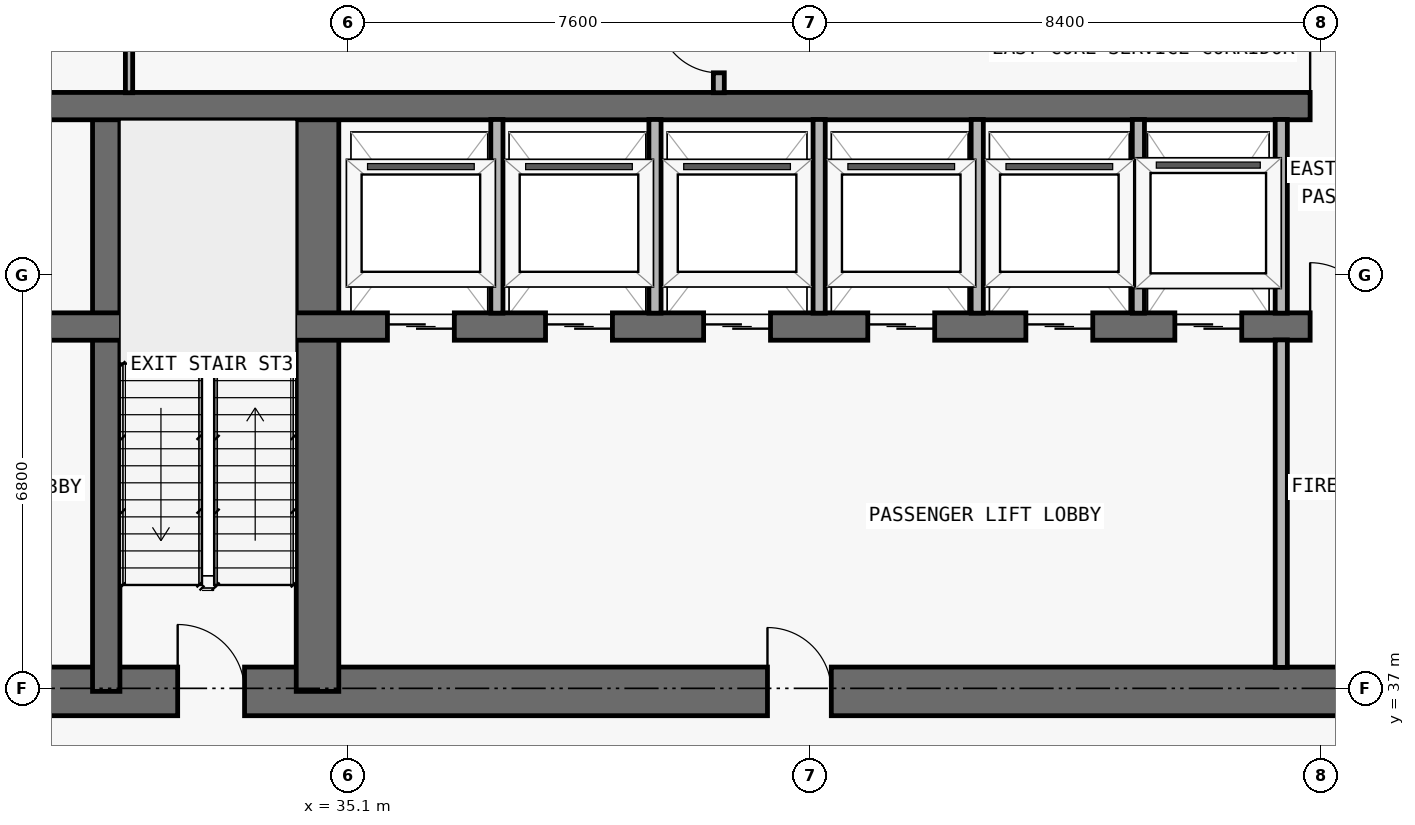
"""IFC4 building model, lengths in metres.
Left out: names, types, materials, properties, quantities, classifications, styles, units other than length and angle.
Written with IfcOpenShell. Run it as: python <this file> out.ifc"""

import sys

from ifc_helpers import new_model, si_unit, direction, frame, frame_2d, origin, place, context, subcontext, project, spatial, rectangle, extrude, element, fill, save


model = new_model("IFC4")
c1 = context("Model", 3, precision=1e-05, world=origin(), true_north=direction((0.0, 1.0)))
c2 = subcontext(c1, "Body", "Model", "MODEL_VIEW")
j1 = project(units=[si_unit("LENGTHUNIT", "METRE"), si_unit("PLANEANGLEUNIT", "RADIAN")], contexts=[c1])
p1 = place(None, origin())
s1 = spatial("IfcSite", under=j1, at=p1, CompositionType="ELEMENT")
p2 = place(p1, origin())
s2 = spatial("IfcBuilding", under=s1, at=p2, CompositionType="ELEMENT")
p3 = place(p2, frame((0.0, 0.0, 97.8)))
s3 = spatial("IfcBuildingStorey", under=s2, at=p3, CompositionType="ELEMENT", Elevation=97.8)
p4 = place(p3, frame((17.85, 36.95, 0.0), z_axis=(0.0, 0.0, 1.0), x_axis=(1.0, 0.0, 0.0)))
e1 = element("IfcWall", 1, at=p4, inside=s3, PredefinedType="SHEAR", context=c2, shape_type="SweptSolid", body=[
    extrude(rectangle(XDim=42.1, YDim=0.8, at=frame_2d((21.05, 0.0))), origin(), (0.0, 0.0, 1.0), 4.55),
])
p5 = place(p4, frame((14.45, 0.0, 0.0)))
e2 = element("IfcOpeningElement", 2, at=p5, cuts=e1, PredefinedType="OPENING", context=c2, shape_type="SweptSolid", body=[
    extrude(rectangle(XDim=1.1, YDim=2.15, at=frame_2d((0.55, 1.075))), frame((0.0, 0.41, 0.0), z_axis=(0.0, -1.0, 0.0), x_axis=(1.0, 0.0, 0.0)), (0.0, 0.0, 1.0), 0.82),
])
p6 = place(p4, frame((6.3, 0.0, 0.0)))
e3 = element("IfcOpeningElement", 3, at=p6, cuts=e1, PredefinedType="OPENING", context=c2, shape_type="SweptSolid", body=[
    extrude(rectangle(XDim=1.05, YDim=2.15, at=frame_2d((0.525, 1.075))), frame((0.0, 0.41, 0.0), z_axis=(0.0, -1.0, 0.0), x_axis=(1.0, 0.0, 0.0)), (0.0, 0.0, 1.0), 0.82),
])
p7 = place(p4, frame((34.8, 0.0, 0.0)))
e4 = element("IfcOpeningElement", 4, at=p7, cuts=e1, PredefinedType="OPENING", context=c2, shape_type="SweptSolid", body=[
    extrude(rectangle(XDim=1.05, YDim=2.15, at=frame_2d((0.525, 1.075))), frame((0.0, 0.41, 0.0), z_axis=(0.0, -1.0, 0.0), x_axis=(1.0, 0.0, 0.0)), (0.0, 0.0, 1.0), 0.82),
])
p8 = place(p4, frame((10.913, 0.0, 0.0)))
e5 = element("IfcOpeningElement", 5, at=p8, cuts=e1, PredefinedType="OPENING", context=c2, shape_type="SweptSolid", body=[
    extrude(rectangle(XDim=1.05, YDim=2.15, at=frame_2d((0.525, 1.075))), frame((0.0, 0.41, 0.0), z_axis=(0.0, -1.0, 0.0), x_axis=(1.0, 0.0, 0.0)), (0.0, 0.0, 1.0), 0.82),
])
p9 = place(p4, frame((24.15, 0.0, 0.0)))
e6 = element("IfcOpeningElement", 6, at=p9, cuts=e1, PredefinedType="OPENING", context=c2, shape_type="SweptSolid", body=[
    extrude(rectangle(XDim=1.05, YDim=2.15, at=frame_2d((0.525, 1.075))), frame((0.0, 0.41, 0.0), z_axis=(0.0, -1.0, 0.0), x_axis=(1.0, 0.0, 0.0)), (0.0, 0.0, 1.0), 0.82),
])
p10 = place(p3, frame((31.125, 36.95, 0.0), z_axis=(0.0, 0.0, 1.0), x_axis=(0.0, 1.0, 0.0)))
e7 = element("IfcWall", 7, at=p10, inside=s3, PredefinedType="SHEAR", context=c2, shape_type="SweptSolid", body=[
    extrude(rectangle(XDim=9.625, YDim=0.45, at=frame_2d((4.812, 0.0))), origin(), (0.0, 0.0, 1.0), 4.55),
])
p11 = place(p3, frame((34.6, 36.95, 0.0), z_axis=(0.0, 0.0, 1.0), x_axis=(0.0, 1.0, 0.0)))
e8 = element("IfcWall", 8, at=p11, inside=s3, PredefinedType="SHEAR", context=c2, shape_type="SweptSolid", body=[
    extrude(rectangle(XDim=9.625, YDim=0.7, at=frame_2d((4.812, 0.0))), origin(), (0.0, 0.0, 1.0), 4.55),
])
p12 = place(p3, frame((22.25, 42.95, 0.0), z_axis=(0.0, 0.0, 1.0), x_axis=(1.0, 0.0, 0.0)))
e9 = element("IfcWall", 9, at=p12, inside=s3, PredefinedType="SHEAR", context=c2, shape_type="SweptSolid", body=[
    extrude(rectangle(XDim=33.3, YDim=0.45, at=frame_2d((16.65, 0.0))), origin(), (0.0, 0.0, 1.0), 4.55),
])
p13 = place(p12, frame((1.05, 0.0, 0.0)))
e10 = element("IfcOpeningElement", 10, at=p13, cuts=e9, PredefinedType="OPENING", context=c2, shape_type="SweptSolid", body=[
    extrude(rectangle(XDim=1.2, YDim=2.2, at=frame_2d((0.6, 1.1))), frame((0.0, 0.235, 0.0), z_axis=(0.0, -1.0, 0.0), x_axis=(1.0, 0.0, 0.0)), (0.0, 0.0, 1.0), 0.47),
])
p14 = place(p12, frame((31.05, 0.0, 0.0)))
e11 = element("IfcOpeningElement", 11, at=p14, cuts=e9, PredefinedType="OPENING", context=c2, shape_type="SweptSolid", body=[
    extrude(rectangle(XDim=1.2, YDim=2.2, at=frame_2d((0.6, 1.1))), frame((0.0, 0.235, 0.0), z_axis=(0.0, -1.0, 0.0), x_axis=(1.0, 0.0, 0.0)), (0.0, 0.0, 1.0), 0.47),
])
p15 = place(p12, frame((13.5, 0.0, 0.0)))
e12 = element("IfcOpeningElement", 12, at=p15, cuts=e9, PredefinedType="OPENING", context=c2, shape_type="SweptSolid", body=[
    extrude(rectangle(XDim=1.1, YDim=2.2, at=frame_2d((0.55, 1.1))), frame((0.0, 0.235, 0.0), z_axis=(0.0, -1.0, 0.0), x_axis=(1.0, 0.0, 0.0)), (0.0, 0.0, 1.0), 0.47),
])
p16 = place(p12, frame((16.1, 0.0, 0.0)))
e13 = element("IfcOpeningElement", 13, at=p16, cuts=e9, PredefinedType="OPENING", context=c2, shape_type="SweptSolid", body=[
    extrude(rectangle(XDim=1.1, YDim=2.2, at=frame_2d((0.55, 1.1))), frame((0.0, 0.235, 0.0), z_axis=(0.0, -1.0, 0.0), x_axis=(1.0, 0.0, 0.0)), (0.0, 0.0, 1.0), 0.47),
])
p17 = place(p12, frame((18.7, 0.0, 0.0)))
e14 = element("IfcOpeningElement", 14, at=p17, cuts=e9, PredefinedType="OPENING", context=c2, shape_type="SweptSolid", body=[
    extrude(rectangle(XDim=1.1, YDim=2.2, at=frame_2d((0.55, 1.1))), frame((0.0, 0.235, 0.0), z_axis=(0.0, -1.0, 0.0), x_axis=(1.0, 0.0, 0.0)), (0.0, 0.0, 1.0), 0.47),
])
p18 = place(p12, frame((21.4, 0.0, 0.0)))
e15 = element("IfcOpeningElement", 15, at=p18, cuts=e9, PredefinedType="OPENING", context=c2, shape_type="SweptSolid", body=[
    extrude(rectangle(XDim=1.1, YDim=2.2, at=frame_2d((0.55, 1.1))), frame((0.0, 0.235, 0.0), z_axis=(0.0, -1.0, 0.0), x_axis=(1.0, 0.0, 0.0)), (0.0, 0.0, 1.0), 0.47),
])
p19 = place(p12, frame((24.0, 0.0, 0.0)))
e16 = element("IfcOpeningElement", 16, at=p19, cuts=e9, PredefinedType="OPENING", context=c2, shape_type="SweptSolid", body=[
    extrude(rectangle(XDim=1.1, YDim=2.2, at=frame_2d((0.55, 1.1))), frame((0.0, 0.235, 0.0), z_axis=(0.0, -1.0, 0.0), x_axis=(1.0, 0.0, 0.0)), (0.0, 0.0, 1.0), 0.47),
])
p20 = place(p12, frame((26.45, 0.0, 0.0)))
e17 = element("IfcOpeningElement", 17, at=p20, cuts=e9, PredefinedType="OPENING", context=c2, shape_type="SweptSolid", body=[
    extrude(rectangle(XDim=1.1, YDim=2.2, at=frame_2d((0.55, 1.1))), frame((0.0, 0.235, 0.0), z_axis=(0.0, -1.0, 0.0), x_axis=(1.0, 0.0, 0.0)), (0.0, 0.0, 1.0), 0.47),
])
p21 = place(p12, frame((5.95, 0.0, 0.0)))
e18 = element("IfcOpeningElement", 18, at=p21, cuts=e9, PredefinedType="OPENING", context=c2, shape_type="SweptSolid", body=[
    extrude(rectangle(XDim=1.1, YDim=2.2, at=frame_2d((0.55, 1.1))), frame((0.0, 0.235, 0.0), z_axis=(0.0, -1.0, 0.0), x_axis=(1.0, 0.0, 0.0)), (0.0, 0.0, 1.0), 0.47),
])
p22 = place(p12, frame((3.625, 0.0, 0.0)))
e19 = element("IfcOpeningElement", 19, at=p22, cuts=e9, PredefinedType="OPENING", context=c2, shape_type="SweptSolid", body=[
    extrude(rectangle(XDim=1.05, YDim=2.15, at=frame_2d((0.525, 1.075))), frame((0.0, 0.235, 0.0), z_axis=(0.0, -1.0, 0.0), x_axis=(1.0, 0.0, 0.0)), (0.0, 0.0, 1.0), 0.47),
])
p23 = place(p12, frame((28.675, 0.0, 0.0)))
e20 = element("IfcOpeningElement", 20, at=p23, cuts=e9, PredefinedType="OPENING", context=c2, shape_type="SweptSolid", body=[
    extrude(rectangle(XDim=1.05, YDim=2.15, at=frame_2d((0.525, 1.075))), frame((0.0, 0.235, 0.0), z_axis=(0.0, -1.0, 0.0), x_axis=(1.0, 0.0, 0.0)), (0.0, 0.0, 1.0), 0.47),
])
p24 = place(p3, frame((18.25, 46.575, 0.0), z_axis=(0.0, 0.0, 1.0), x_axis=(1.0, 0.0, 0.0)))
e21 = element("IfcWall", 21, at=p24, inside=s3, PredefinedType="SHEAR", context=c2, shape_type="SweptSolid", body=[
    extrude(rectangle(XDim=41.3, YDim=0.45, at=frame_2d((20.65, 0.0))), origin(), (0.0, 0.0, 1.0), 4.55),
])
p25 = place(p24, frame((7.65, 0.0, 0.0)))
e22 = element("IfcOpeningElement", 22, at=p25, cuts=e21, PredefinedType="OPENING", context=c2, shape_type="SweptSolid", body=[
    extrude(rectangle(XDim=1.0, YDim=2.2, at=frame_2d((0.5, 1.1))), frame((0.0, 0.235, 0.0), z_axis=(0.0, -1.0, 0.0), x_axis=(1.0, 0.0, 0.0)), (0.0, 0.0, 1.0), 0.47),
])
p26 = place(p24, frame((32.675, 0.0, 0.0)))
e23 = element("IfcOpeningElement", 23, at=p26, cuts=e21, PredefinedType="OPENING", context=c2, shape_type="SweptSolid", body=[
    extrude(rectangle(XDim=1.05, YDim=2.15, at=frame_2d((0.525, 1.075))), frame((0.0, 0.235, 0.0), z_axis=(0.0, -1.0, 0.0), x_axis=(1.0, 0.0, 0.0)), (0.0, 0.0, 1.0), 0.47),
])
p27 = place(p3, frame((31.5, 46.795, 0.0), z_axis=(0.0, 0.0, 1.0), x_axis=(0.0, 1.0, 0.0)))
e24 = element("IfcWall", 24, at=p27, inside=s3, PredefinedType="PARTITIONING", context=c2, shape_type="SweptSolid", body=[
    extrude(rectangle(XDim=3.06, YDim=0.12, at=frame_2d((1.53, 0.0))), origin(), (0.0, 0.0, 1.0), 4.55),
])
for number, where, z_axis, x_axis in (
    (25, (37.55, 43.17, 0.0), (0.0, 0.0, 1.0), (0.0, 1.0, 0.0)),
    (26, (40.15, 43.17, 0.0), (0.0, 0.0, 1.0), (0.0, 1.0, 0.0)),
):
    element("IfcWall", number, at=place(p3, frame(where, z_axis=z_axis, x_axis=x_axis)), inside=s3, PredefinedType="PARTITIONING", context=c2, shape_type="SweptSolid", body=[
        extrude(rectangle(XDim=3.185, YDim=0.2, at=frame_2d((1.593, 0.0))), origin(), (0.0, 0.0, 1.0), 4.55),
    ])
p28 = place(p3, frame((41.2, 46.795, 0.0), z_axis=(0.0, 0.0, 1.0), x_axis=(0.0, 1.0, 0.0)))
e27 = element("IfcWall", 27, at=p28, inside=s3, PredefinedType="PARTITIONING", context=c2, shape_type="SweptSolid", body=[
    extrude(rectangle(XDim=3.06, YDim=0.18, at=frame_2d((1.53, 0.0))), origin(), (0.0, 0.0, 1.0), 4.55),
])
p29 = place(p28, frame((0.327, 0.0, 0.0)))
e28 = element("IfcOpeningElement", 28, at=p29, cuts=e27, PredefinedType="OPENING", context=c2, shape_type="SweptSolid", body=[
    extrude(rectangle(XDim=1.0, YDim=2.2, at=frame_2d((0.5, 1.1))), frame((0.0, 0.1, 0.0), z_axis=(0.0, -1.0, 0.0), x_axis=(1.0, 0.0, 0.0)), (0.0, 0.0, 1.0), 0.2),
])
for number, where, z_axis, x_axis in (
    (29, (42.85, 43.17, 0.0), (0.0, 0.0, 1.0), (0.0, 1.0, 0.0)),
    (30, (45.45, 43.17, 0.0), (0.0, 0.0, 1.0), (0.0, 1.0, 0.0)),
    (31, (48.1, 43.17, 0.0), (0.0, 0.0, 1.0), (0.0, 1.0, 0.0)),
):
    element("IfcWall", number, at=place(p3, frame(where, z_axis=z_axis, x_axis=x_axis)), inside=s3, PredefinedType="PARTITIONING", context=c2, shape_type="SweptSolid", body=[
        extrude(rectangle(XDim=3.185, YDim=0.2, at=frame_2d((1.593, 0.0))), origin(), (0.0, 0.0, 1.0), 4.55),
    ])
p30 = place(p3, frame((50.45, 37.345, 0.0), z_axis=(0.0, 0.0, 1.0), x_axis=(0.0, 1.0, 0.0)))
e32 = element("IfcWall", 32, at=p30, inside=s3, PredefinedType="PARTITIONING", context=c2, shape_type="SweptSolid", body=[
    extrude(rectangle(XDim=5.385, YDim=0.2, at=frame_2d((2.692, 0.0))), origin(), (0.0, 0.0, 1.0), 4.55),
])
p31 = place(p3, frame((50.45, 43.17, 0.0), z_axis=(0.0, 0.0, 1.0), x_axis=(0.0, 1.0, 0.0)))
e33 = element("IfcWall", 33, at=p31, inside=s3, PredefinedType="PARTITIONING", context=c2, shape_type="SweptSolid", body=[
    extrude(rectangle(XDim=3.185, YDim=0.2, at=frame_2d((1.593, 0.0))), origin(), (0.0, 0.0, 1.0), 4.55),
])
p32 = place(p15, origin())
e34 = element("IfcDoor", 34, at=p32, inside=s3, OperationType="DOUBLE_DOOR_SLIDING", PredefinedType="DOOR", context=c2, shape_type="SweptSolid", body=[
    extrude(rectangle(XDim=1.1, YDim=2.2, at=frame_2d((0.55, 1.1))), frame((0.0, 0.025, 0.0), z_axis=(0.0, -1.0, 0.0), x_axis=(1.0, 0.0, 0.0)), (0.0, 0.0, 1.0), 0.05),
])
fill(e12, e34)
p33 = place(p16, origin())
e35 = element("IfcDoor", 35, at=p33, inside=s3, OperationType="DOUBLE_DOOR_SLIDING", PredefinedType="DOOR", context=c2, shape_type="SweptSolid", body=[
    extrude(rectangle(XDim=1.1, YDim=2.2, at=frame_2d((0.55, 1.1))), frame((0.0, 0.025, 0.0), z_axis=(0.0, -1.0, 0.0), x_axis=(1.0, 0.0, 0.0)), (0.0, 0.0, 1.0), 0.05),
])
fill(e13, e35)
p34 = place(p17, origin())
e36 = element("IfcDoor", 36, at=p34, inside=s3, OperationType="DOUBLE_DOOR_SLIDING", PredefinedType="DOOR", context=c2, shape_type="SweptSolid", body=[
    extrude(rectangle(XDim=1.1, YDim=2.2, at=frame_2d((0.55, 1.1))), frame((0.0, 0.025, 0.0), z_axis=(0.0, -1.0, 0.0), x_axis=(1.0, 0.0, 0.0)), (0.0, 0.0, 1.0), 0.05),
])
fill(e14, e36)
p35 = place(p18, origin())
e37 = element("IfcDoor", 37, at=p35, inside=s3, OperationType="DOUBLE_DOOR_SLIDING", PredefinedType="DOOR", context=c2, shape_type="SweptSolid", body=[
    extrude(rectangle(XDim=1.1, YDim=2.2, at=frame_2d((0.55, 1.1))), frame((0.0, 0.025, 0.0), z_axis=(0.0, -1.0, 0.0), x_axis=(1.0, 0.0, 0.0)), (0.0, 0.0, 1.0), 0.05),
])
fill(e15, e37)
p36 = place(p19, origin())
e38 = element("IfcDoor", 38, at=p36, inside=s3, OperationType="DOUBLE_DOOR_SLIDING", PredefinedType="DOOR", context=c2, shape_type="SweptSolid", body=[
    extrude(rectangle(XDim=1.1, YDim=2.2, at=frame_2d((0.55, 1.1))), frame((0.0, 0.025, 0.0), z_axis=(0.0, -1.0, 0.0), x_axis=(1.0, 0.0, 0.0)), (0.0, 0.0, 1.0), 0.05),
])
fill(e16, e38)
p37 = place(p20, origin())
e39 = element("IfcDoor", 39, at=p37, inside=s3, OperationType="DOUBLE_DOOR_SLIDING", PredefinedType="DOOR", context=c2, shape_type="SweptSolid", body=[
    extrude(rectangle(XDim=1.1, YDim=2.2, at=frame_2d((0.55, 1.1))), frame((0.0, 0.025, 0.0), z_axis=(0.0, -1.0, 0.0), x_axis=(1.0, 0.0, 0.0)), (0.0, 0.0, 1.0), 0.05),
])
fill(e17, e39)
p38 = place(p5, origin())
e40 = element("IfcDoor", 40, at=p38, inside=s3, OperationType="SINGLE_SWING_LEFT", PredefinedType="DOOR", context=c2, shape_type="SweptSolid", body=[
    extrude(rectangle(XDim=1.1, YDim=2.15, at=frame_2d((0.55, 1.075))), frame((0.0, 0.025, 0.0), z_axis=(0.0, -1.0, 0.0), x_axis=(1.0, 0.0, 0.0)), (0.0, 0.0, 1.0), 0.05),
])
fill(e2, e40)
p39 = place(p23, origin())
e41 = element("IfcDoor", 41, at=p39, inside=s3, OperationType="SINGLE_SWING_LEFT", PredefinedType="DOOR", context=c2, shape_type="SweptSolid", body=[
    extrude(rectangle(XDim=1.05, YDim=2.15, at=frame_2d((0.525, 1.075))), frame((0.0, 0.025, 0.0), z_axis=(0.0, -1.0, 0.0), x_axis=(1.0, 0.0, 0.0)), (0.0, 0.0, 1.0), 0.05),
])
fill(e20, e41)
p40 = place(p9, origin())
e42 = element("IfcDoor", 42, at=p40, inside=s3, OperationType="SINGLE_SWING_LEFT", PredefinedType="DOOR", context=c2, shape_type="SweptSolid", body=[
    extrude(rectangle(XDim=1.05, YDim=2.15, at=frame_2d((0.525, 1.075))), frame((0.0, 0.025, 0.0), z_axis=(0.0, -1.0, 0.0), x_axis=(1.0, 0.0, 0.0)), (0.0, 0.0, 1.0), 0.05),
])
fill(e6, e42)
p41 = place(p26, origin())
e43 = element("IfcDoor", 43, at=p41, inside=s3, OperationType="SINGLE_SWING_LEFT", PredefinedType="DOOR", context=c2, shape_type="SweptSolid", body=[
    extrude(rectangle(XDim=1.05, YDim=2.15, at=frame_2d((0.525, 1.075))), frame((0.0, 0.025, 0.0), z_axis=(0.0, -1.0, 0.0), x_axis=(1.0, 0.0, 0.0)), (0.0, 0.0, 1.0), 0.05),
])
fill(e23, e43)
p42 = place(p29, origin())
e44 = element("IfcDoor", 44, at=p42, inside=s3, OperationType="SINGLE_SWING_RIGHT", PredefinedType="DOOR", context=c2, shape_type="SweptSolid", body=[
    extrude(rectangle(XDim=1.0, YDim=2.2, at=frame_2d((0.5, 1.1))), frame((0.0, 0.025, 0.0), z_axis=(0.0, -1.0, 0.0), x_axis=(1.0, 0.0, 0.0)), (0.0, 0.0, 1.0), 0.05),
])
fill(e28, e44)
save(model, sys.argv[1])
